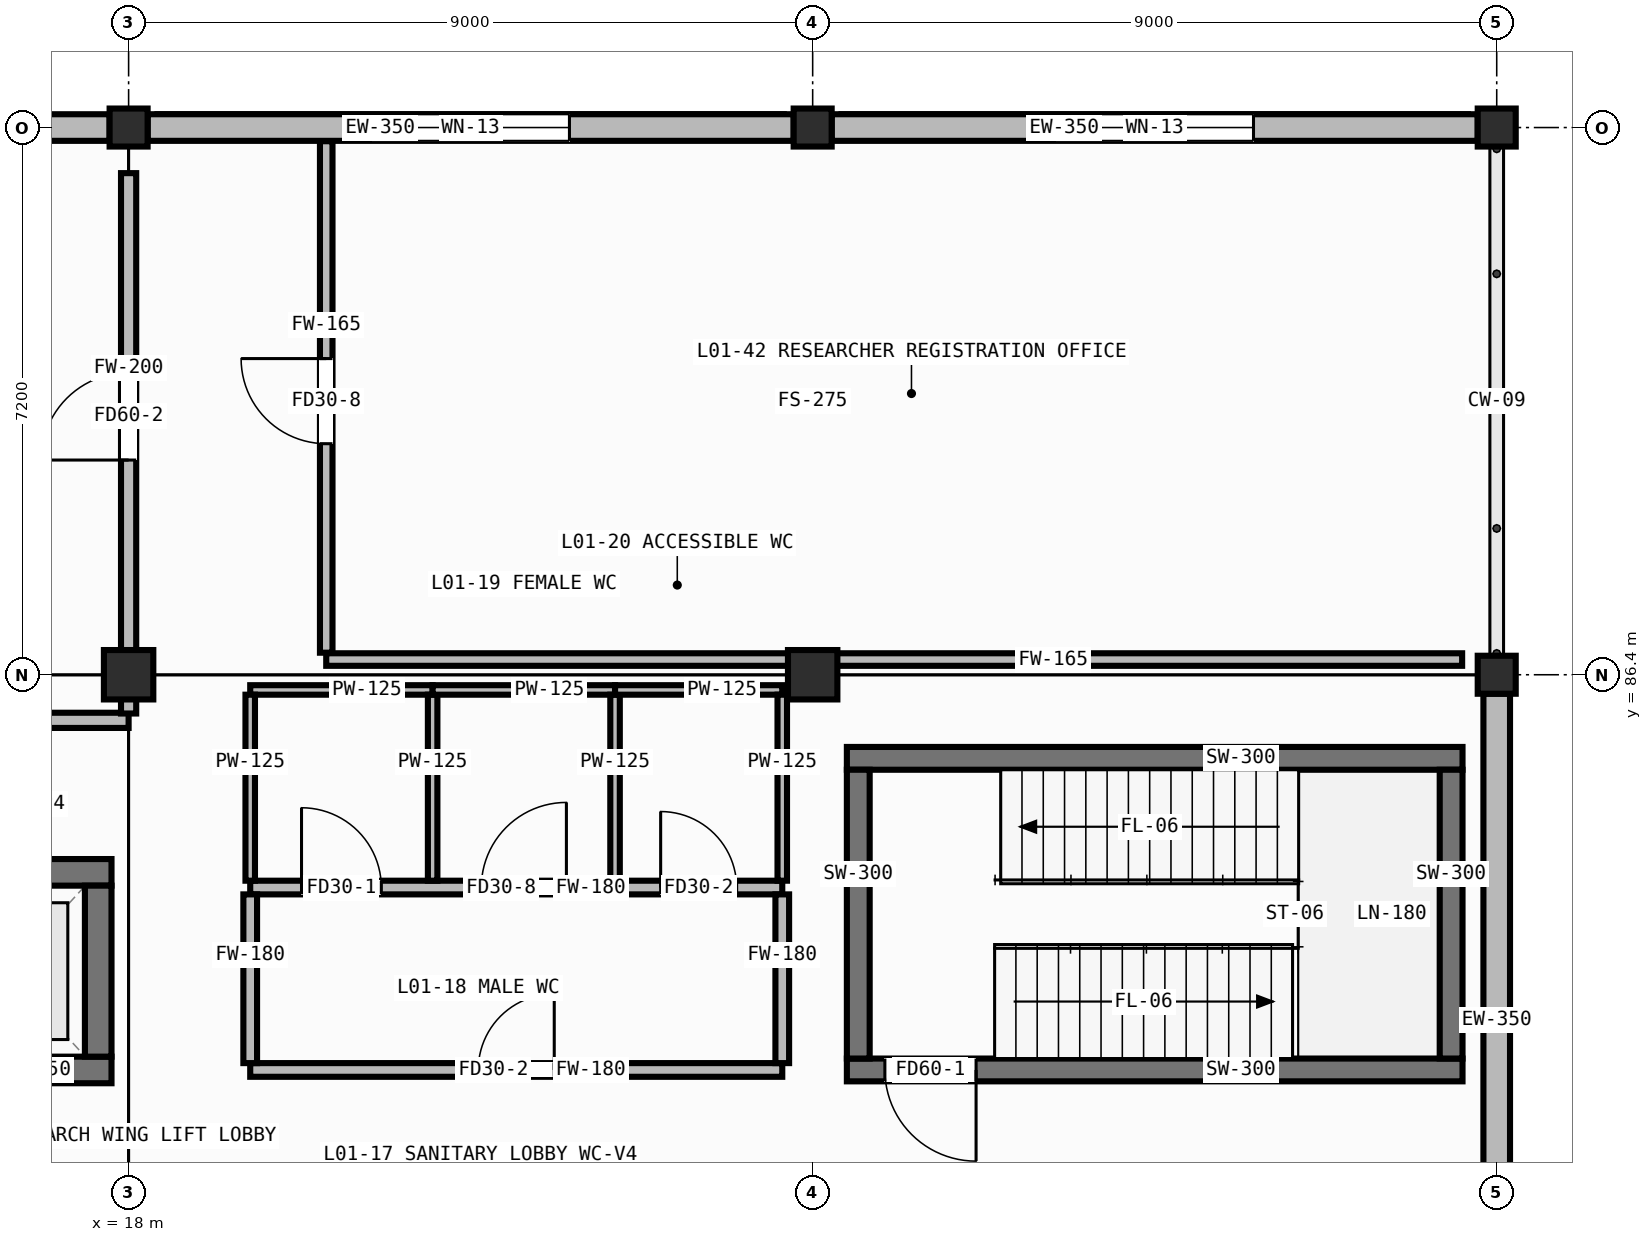
"""IFC4 building model, lengths in metres.
Left out: names, types, materials, properties, quantities, classifications, styles, units other than length and angle.
Written with IfcOpenShell. Run it as: python <this file> out.ifc"""

import sys

from ifc_helpers import new_model, si_unit, direction, frame, frame_2d, origin, origin_2d, place, context, subcontext, project, spatial, rectangle, hollow_rectangle, extrude, element, fill, save


model = new_model("IFC4")
c1 = context("Model", 3, precision=1e-05, world=origin(), true_north=direction((0.0, 1.0)))
c2 = subcontext(c1, "Body", "Model", "MODEL_VIEW")
j1 = project(units=[si_unit("LENGTHUNIT", "METRE"), si_unit("PLANEANGLEUNIT", "RADIAN")], contexts=[c1])
p1 = place(None, origin())
s1 = spatial("IfcSite", under=j1, at=p1, CompositionType="ELEMENT")
p2 = place(p1, origin())
s2 = spatial("IfcBuilding", under=s1, at=p2, CompositionType="ELEMENT")
p3 = place(p2, origin())
s3 = spatial("IfcBuildingStorey", under=s2, at=p3, CompositionType="ELEMENT", Elevation=0.0)
p4 = place(p3, frame((18.0, 86.4, 0.0), z_axis=(0.0, 0.0, 1.0), x_axis=(1.0, 0.0, 0.0)))
e1 = element("IfcColumn", 1, at=p4, inside=s3, PredefinedType="COLUMN", context=c2, shape_type="SweptSolid", body=[
    extrude(hollow_rectangle(XDim=0.65, YDim=0.65, WallThickness=0.025, at=origin_2d()), origin(), (0.0, 0.0, 1.0), 4.8),
])
p5 = place(p3, frame((18.0, 93.6, 0.0), z_axis=(0.0, 0.0, 1.0), x_axis=(1.0, 0.0, 0.0)))
e2 = element("IfcColumn", 2, at=p5, inside=s3, PredefinedType="COLUMN", context=c2, shape_type="SweptSolid", body=[
    extrude(hollow_rectangle(XDim=0.5, YDim=0.5, WallThickness=0.022, at=origin_2d()), origin(), (0.0, 0.0, 1.0), 4.8),
])
p6 = place(p3, frame((27.0, 86.4, 0.0), z_axis=(0.0, 0.0, 1.0), x_axis=(1.0, 0.0, 0.0)))
e3 = element("IfcColumn", 3, at=p6, inside=s3, PredefinedType="COLUMN", context=c2, shape_type="SweptSolid", body=[
    extrude(hollow_rectangle(XDim=0.65, YDim=0.65, WallThickness=0.025, at=origin_2d()), origin(), (0.0, 0.0, 1.0), 4.8),
])
for number, where, z_axis, x_axis in (
    (4, (27.0, 93.6, 0.0), (0.0, 0.0, 1.0), (1.0, 0.0, 0.0)),
    (5, (36.0, 86.4, 0.0), (0.0, 0.0, 1.0), (1.0, 0.0, 0.0)),
    (6, (36.0, 93.6, 0.0), (0.0, 0.0, 1.0), (1.0, 0.0, 0.0)),
):
    element("IfcColumn", number, at=place(p3, frame(where, z_axis=z_axis, x_axis=x_axis)), inside=s3, PredefinedType="COLUMN", context=c2, shape_type="SweptSolid", body=[
        extrude(hollow_rectangle(XDim=0.5, YDim=0.5, WallThickness=0.022, at=origin_2d()), origin(), (0.0, 0.0, 1.0), 4.8),
    ])
p7 = place(p3, frame((17.75, 93.6, 0.0), z_axis=(0.0, 0.0, 1.0), x_axis=(-1.0, 0.0, 0.0)))
e7 = element("IfcWall", 7, at=p7, inside=s3, PredefinedType="STANDARD", context=c2, shape_type="SweptSolid", body=[
    extrude(rectangle(XDim=8.5, YDim=0.35, at=frame_2d((4.25, 0.0))), origin(), (0.0, 0.0, 1.0), 4.055),
])
p8 = place(p7, frame((3.3, 0.0, 0.0)))
e8 = element("IfcOpeningElement", 8, at=p8, cuts=e7, PredefinedType="OPENING", context=c2, shape_type="SweptSolid", body=[
    extrude(rectangle(XDim=1.9, YDim=2.4, at=frame_2d((0.95, 1.2))), frame((0.0, 0.187, 0.0), z_axis=(0.0, -1.0, 0.0), x_axis=(1.0, 0.0, 0.0)), (0.0, 0.0, 1.0), 0.374),
])
p9 = place(p3, frame((26.75, 93.6, 0.0), z_axis=(0.0, 0.0, 1.0), x_axis=(-1.0, 0.0, 0.0)))
e9 = element("IfcWall", 9, at=p9, inside=s3, PredefinedType="STANDARD", context=c2, shape_type="SweptSolid", body=[
    extrude(rectangle(XDim=8.5, YDim=0.35, at=frame_2d((4.25, 0.0))), origin(), (0.0, 0.0, 1.0), 4.055),
])
p10 = place(p9, frame((2.95, 0.0, 0.85)))
e10 = element("IfcOpeningElement", 10, at=p10, cuts=e9, PredefinedType="OPENING", context=c2, shape_type="SweptSolid", body=[
    extrude(rectangle(XDim=2.6, YDim=1.6, at=frame_2d((1.3, 0.8))), frame((0.0, 0.187, 0.0), z_axis=(0.0, -1.0, 0.0), x_axis=(1.0, 0.0, 0.0)), (0.0, 0.0, 1.0), 0.374),
])
p11 = place(p3, frame((35.75, 93.6, 0.0), z_axis=(0.0, 0.0, 1.0), x_axis=(-1.0, 0.0, 0.0)))
e11 = element("IfcWall", 11, at=p11, inside=s3, PredefinedType="STANDARD", context=c2, shape_type="SweptSolid", body=[
    extrude(rectangle(XDim=8.5, YDim=0.35, at=frame_2d((4.25, 0.0))), origin(), (0.0, 0.0, 1.0), 4.055),
])
p12 = place(p11, frame((2.95, 0.0, 0.85)))
e12 = element("IfcOpeningElement", 12, at=p12, cuts=e11, PredefinedType="OPENING", context=c2, shape_type="SweptSolid", body=[
    extrude(rectangle(XDim=2.6, YDim=1.6, at=frame_2d((1.3, 0.8))), frame((0.0, 0.187, 0.0), z_axis=(0.0, -1.0, 0.0), x_axis=(1.0, 0.0, 0.0)), (0.0, 0.0, 1.0), 0.374),
])
p13 = place(p3, frame((36.0, 86.15, 0.0), z_axis=(0.0, 0.0, 1.0), x_axis=(0.0, -1.0, 0.0)))
e13 = element("IfcWall", 13, at=p13, inside=s3, PredefinedType="STANDARD", context=c2, shape_type="SweptSolid", body=[
    extrude(rectangle(XDim=6.7, YDim=0.35, at=frame_2d((3.35, 0.0))), origin(), (0.0, 0.0, 1.0), 4.055),
])
p14 = place(p3, frame((27.45, 81.2, 0.0), z_axis=(0.0, 0.0, 1.0), x_axis=(1.0, 0.0, 0.0)))
e14 = element("IfcWall", 14, at=p14, inside=s3, PredefinedType="SHEAR", context=c2, shape_type="SweptSolid", body=[
    extrude(rectangle(XDim=8.1, YDim=0.3, at=frame_2d((4.05, 0.0))), origin(), (0.0, 0.0, 1.0), 4.555),
])
p15 = place(p14, frame((0.5, 0.0, 0.0)))
e15 = element("IfcOpeningElement", 15, at=p15, cuts=e14, PredefinedType="OPENING", context=c2, shape_type="SweptSolid", body=[
    extrude(rectangle(XDim=1.2, YDim=2.1, at=frame_2d((0.6, 1.05))), frame((0.0, 0.162, 0.0), z_axis=(0.0, -1.0, 0.0), x_axis=(1.0, 0.0, 0.0)), (0.0, 0.0, 1.0), 0.324),
])
p16 = place(p3, frame((27.45, 85.3, 0.0), z_axis=(0.0, 0.0, 1.0), x_axis=(1.0, 0.0, 0.0)))
e16 = element("IfcWall", 16, at=p16, inside=s3, PredefinedType="SHEAR", context=c2, shape_type="SweptSolid", body=[
    extrude(rectangle(XDim=8.1, YDim=0.3, at=frame_2d((4.05, 0.0))), origin(), (0.0, 0.0, 1.0), 4.555),
])
for number, where, z_axis, x_axis in (
    (17, (27.6, 81.35, 0.0), (0.0, 0.0, 1.0), (0.0, 1.0, 0.0)),
    (18, (35.4, 81.35, 0.0), (0.0, 0.0, 1.0), (0.0, 1.0, 0.0)),
):
    element("IfcWall", number, at=place(p3, frame(where, z_axis=z_axis, x_axis=x_axis)), inside=s3, PredefinedType="SHEAR", context=c2, shape_type="SweptSolid", body=[
        extrude(rectangle(XDim=3.8, YDim=0.3, at=frame_2d((1.9, 0.0))), origin(), (0.0, 0.0, 1.0), 4.555),
    ])
p17 = place(p3, frame((15.025, 81.2, 0.0), z_axis=(0.0, 0.0, 1.0), x_axis=(1.0, 0.0, 0.0)))
e19 = element("IfcWall", 19, at=p17, inside=s3, PredefinedType="SHEAR", context=c2, shape_type="SweptSolid", body=[
    extrude(rectangle(XDim=2.75, YDim=0.35, at=frame_2d((1.375, 0.0))), origin(), (0.0, 0.0, 1.0), 4.555),
])
p18 = place(p17, frame((0.825, 0.0, 0.0)))
e20 = element("IfcOpeningElement", 20, at=p18, cuts=e19, PredefinedType="OPENING", context=c2, shape_type="SweptSolid", body=[
    extrude(rectangle(XDim=1.1, YDim=2.1, at=frame_2d((0.55, 1.05))), frame((0.0, 0.187, 0.0), z_axis=(0.0, -1.0, 0.0), x_axis=(1.0, 0.0, 0.0)), (0.0, 0.0, 1.0), 0.374),
])
p19 = place(p3, frame((15.025, 83.8, 0.0), z_axis=(0.0, 0.0, 1.0), x_axis=(1.0, 0.0, 0.0)))
e21 = element("IfcWall", 21, at=p19, inside=s3, PredefinedType="SHEAR", context=c2, shape_type="SweptSolid", body=[
    extrude(rectangle(XDim=2.75, YDim=0.35, at=frame_2d((1.375, 0.0))), origin(), (0.0, 0.0, 1.0), 4.555),
])
p20 = place(p3, frame((17.6, 81.375, 0.0), z_axis=(0.0, 0.0, 1.0), x_axis=(0.0, 1.0, 0.0)))
e22 = element("IfcWall", 22, at=p20, inside=s3, PredefinedType="SHEAR", context=c2, shape_type="SweptSolid", body=[
    extrude(rectangle(XDim=2.25, YDim=0.35, at=frame_2d((1.125, 0.0))), origin(), (0.0, 0.0, 1.0), 4.555),
])
p21 = place(p3, frame((19.6, 81.2, 0.0), z_axis=(0.0, 0.0, 1.0), x_axis=(1.0, 0.0, 0.0)))
e23 = element("IfcWall", 23, at=p21, inside=s3, PredefinedType="PARTITIONING", context=c2, shape_type="SweptSolid", body=[
    extrude(rectangle(XDim=7.0, YDim=0.18, at=frame_2d((3.5, 0.0))), origin(), (0.0, 0.0, 1.0), 4.555),
])
p22 = place(p21, frame((3.0, 0.0, 0.0)))
e24 = element("IfcOpeningElement", 24, at=p22, cuts=e23, PredefinedType="OPENING", context=c2, shape_type="SweptSolid", body=[
    extrude(rectangle(XDim=1.0, YDim=2.08, at=frame_2d((0.5, 1.04))), frame((0.0, 0.102, 0.0), z_axis=(0.0, -1.0, 0.0), x_axis=(1.0, 0.0, 0.0)), (0.0, 0.0, 1.0), 0.204),
])
p23 = place(p3, frame((19.6, 83.6, 0.0), z_axis=(0.0, 0.0, 1.0), x_axis=(1.0, 0.0, 0.0)))
e25 = element("IfcWall", 25, at=p23, inside=s3, PredefinedType="PARTITIONING", context=c2, shape_type="SweptSolid", body=[
    extrude(rectangle(XDim=7.0, YDim=0.18, at=frame_2d((3.5, 0.0))), origin(), (0.0, 0.0, 1.0), 4.555),
])
p24 = place(p23, frame((0.675, 0.0, 0.0)))
e26 = element("IfcOpeningElement", 26, at=p24, cuts=e25, PredefinedType="OPENING", context=c2, shape_type="SweptSolid", body=[
    extrude(rectangle(XDim=1.05, YDim=2.1, at=frame_2d((0.525, 1.05))), frame((0.0, 0.102, 0.0), z_axis=(0.0, -1.0, 0.0), x_axis=(1.0, 0.0, 0.0)), (0.0, 0.0, 1.0), 0.204),
])
p25 = place(p23, frame((3.04, 0.0, 0.0)))
e27 = element("IfcOpeningElement", 27, at=p25, cuts=e25, PredefinedType="OPENING", context=c2, shape_type="SweptSolid", body=[
    extrude(rectangle(XDim=1.12, YDim=2.08, at=frame_2d((0.56, 1.04))), frame((0.0, 0.102, 0.0), z_axis=(0.0, -1.0, 0.0), x_axis=(1.0, 0.0, 0.0)), (0.0, 0.0, 1.0), 0.204),
])
p26 = place(p23, frame((5.4, 0.0, 0.0)))
e28 = element("IfcOpeningElement", 28, at=p26, cuts=e25, PredefinedType="OPENING", context=c2, shape_type="SweptSolid", body=[
    extrude(rectangle(XDim=1.0, YDim=2.08, at=frame_2d((0.5, 1.04))), frame((0.0, 0.102, 0.0), z_axis=(0.0, -1.0, 0.0), x_axis=(1.0, 0.0, 0.0)), (0.0, 0.0, 1.0), 0.204),
])
for number, where, z_axis, x_axis in (
    (29, (19.6, 81.29, 0.0), (0.0, 0.0, 1.0), (0.0, 1.0, 0.0)),
    (30, (26.6, 81.29, 0.0), (0.0, 0.0, 1.0), (0.0, 1.0, 0.0)),
):
    element("IfcWall", number, at=place(p3, frame(where, z_axis=z_axis, x_axis=x_axis)), inside=s3, PredefinedType="PARTITIONING", context=c2, shape_type="SweptSolid", body=[
        extrude(rectangle(XDim=2.22, YDim=0.18, at=frame_2d((1.11, 0.0))), origin(), (0.0, 0.0, 1.0), 4.555),
    ])
p27 = place(p3, frame((19.6, 86.2, 0.0), z_axis=(0.0, 0.0, 1.0), x_axis=(1.0, 0.0, 0.0)))
e31 = element("IfcWall", 31, at=p27, inside=s3, PredefinedType="PARTITIONING", context=c2, shape_type="SweptSolid", body=[
    extrude(rectangle(XDim=2.4, YDim=0.125, at=frame_2d((1.2, 0.0))), origin(), (0.0, 0.0, 1.0), 3.835),
])
for number, where, z_axis, x_axis in (
    (32, (19.6, 83.69, 0.0), (0.0, 0.0, 1.0), (0.0, 1.0, 0.0)),
    (33, (22.0, 83.69, 0.0), (0.0, 0.0, 1.0), (0.0, 1.0, 0.0)),
):
    element("IfcWall", number, at=place(p3, frame(where, z_axis=z_axis, x_axis=x_axis)), inside=s3, PredefinedType="PARTITIONING", context=c2, shape_type="SweptSolid", body=[
        extrude(rectangle(XDim=2.448, YDim=0.125, at=frame_2d((1.224, 0.0))), origin(), (0.0, 0.0, 1.0), 4.555),
    ])
p28 = place(p3, frame((22.0, 86.2, 0.0), z_axis=(0.0, 0.0, 1.0), x_axis=(1.0, 0.0, 0.0)))
e34 = element("IfcWall", 34, at=p28, inside=s3, PredefinedType="PARTITIONING", context=c2, shape_type="SweptSolid", body=[
    extrude(rectangle(XDim=2.4, YDim=0.125, at=frame_2d((1.2, 0.0))), origin(), (0.0, 0.0, 1.0), 3.835),
])
p29 = place(p3, frame((24.4, 83.69, 0.0), z_axis=(0.0, 0.0, 1.0), x_axis=(0.0, 1.0, 0.0)))
e35 = element("IfcWall", 35, at=p29, inside=s3, PredefinedType="PARTITIONING", context=c2, shape_type="SweptSolid", body=[
    extrude(rectangle(XDim=2.448, YDim=0.125, at=frame_2d((1.224, 0.0))), origin(), (0.0, 0.0, 1.0), 4.555),
])
p30 = place(p3, frame((24.4, 86.2, 0.0), z_axis=(0.0, 0.0, 1.0), x_axis=(1.0, 0.0, 0.0)))
e36 = element("IfcWall", 36, at=p30, inside=s3, PredefinedType="PARTITIONING", context=c2, shape_type="SweptSolid", body=[
    extrude(rectangle(XDim=2.2, YDim=0.125, at=frame_2d((1.1, 0.0))), origin(), (0.0, 0.0, 1.0), 3.835),
])
p31 = place(p3, frame((26.6, 83.69, 0.0), z_axis=(0.0, 0.0, 1.0), x_axis=(0.0, 1.0, 0.0)))
e37 = element("IfcWall", 37, at=p31, inside=s3, PredefinedType="PARTITIONING", context=c2, shape_type="SweptSolid", body=[
    extrude(rectangle(XDim=2.448, YDim=0.125, at=frame_2d((1.224, 0.0))), origin(), (0.0, 0.0, 1.0), 4.555),
])
p32 = place(p3, frame((0.18, 85.8, 0.0), z_axis=(0.0, 0.0, 1.0), x_axis=(1.0, 0.0, 0.0)))
e38 = element("IfcWall", 38, at=p32, inside=s3, PredefinedType="PARTITIONING", context=c2, shape_type="SweptSolid", body=[
    extrude(rectangle(XDim=17.82, YDim=0.2, at=frame_2d((8.91, 0.0))), origin(), (0.0, 0.0, 1.0), 4.555),
])
p33 = place(p3, frame((18.0, 85.89, 0.0), z_axis=(0.0, 0.0, 1.0), x_axis=(0.0, 1.0, 0.0)))
e39 = element("IfcWall", 39, at=p33, inside=s3, PredefinedType="PARTITIONING", context=c2, shape_type="SweptSolid", body=[
    extrude(rectangle(XDim=7.11, YDim=0.2, at=frame_2d((3.555, 0.0))), origin(), (0.0, 0.0, 1.0), 3.835),
])
p34 = place(p33, frame((3.335, 0.0, 0.0)))
e40 = element("IfcOpeningElement", 40, at=p34, cuts=e39, PredefinedType="OPENING", context=c2, shape_type="SweptSolid", body=[
    extrude(rectangle(XDim=1.15, YDim=2.1, at=frame_2d((0.575, 1.05))), frame((0.0, 0.112, 0.0), z_axis=(0.0, -1.0, 0.0), x_axis=(1.0, 0.0, 0.0)), (0.0, 0.0, 1.0), 0.224),
])
p35 = place(p3, frame((20.6, 86.6, 0.0), z_axis=(0.0, 0.0, 1.0), x_axis=(1.0, 0.0, 0.0)))
e41 = element("IfcWall", 41, at=p35, inside=s3, PredefinedType="PARTITIONING", context=c2, shape_type="SweptSolid", body=[
    extrude(rectangle(XDim=14.945, YDim=0.165, at=frame_2d((7.472, 0.0))), origin(), (0.0, 0.0, 1.0), 3.835),
])
p36 = place(p3, frame((20.6, 86.69, 0.0), z_axis=(0.0, 0.0, 1.0), x_axis=(0.0, 1.0, 0.0)))
e42 = element("IfcWall", 42, at=p36, inside=s3, PredefinedType="PARTITIONING", context=c2, shape_type="SweptSolid", body=[
    extrude(rectangle(XDim=6.73, YDim=0.165, at=frame_2d((3.365, 0.0))), origin(), (0.0, 0.0, 1.0), 4.555),
])
p37 = place(p36, frame((2.75, 0.0, 0.0)))
e43 = element("IfcOpeningElement", 43, at=p37, cuts=e42, PredefinedType="OPENING", context=c2, shape_type="SweptSolid", body=[
    extrude(rectangle(XDim=1.12, YDim=2.08, at=frame_2d((0.56, 1.04))), frame((0.0, 0.094, 0.0), z_axis=(0.0, -1.0, 0.0), x_axis=(1.0, 0.0, 0.0)), (0.0, 0.0, 1.0), 0.189),
])
p38 = place(p10, origin())
e44 = element("IfcWindow", 44, at=p38, inside=s3, PartitioningType="DOUBLE_PANEL_VERTICAL", PredefinedType="WINDOW", context=c2, shape_type="SweptSolid", body=[
    extrude(rectangle(XDim=2.6, YDim=1.6, at=frame_2d((1.3, 0.8))), frame((0.0, 0.03, 0.0), z_axis=(0.0, -1.0, 0.0), x_axis=(1.0, 0.0, 0.0)), (0.0, 0.0, 1.0), 0.06),
])
fill(e10, e44)
p39 = place(p12, origin())
e45 = element("IfcWindow", 45, at=p39, inside=s3, PartitioningType="DOUBLE_PANEL_VERTICAL", PredefinedType="WINDOW", context=c2, shape_type="SweptSolid", body=[
    extrude(rectangle(XDim=2.6, YDim=1.6, at=frame_2d((1.3, 0.8))), frame((0.0, 0.03, 0.0), z_axis=(0.0, -1.0, 0.0), x_axis=(1.0, 0.0, 0.0)), (0.0, 0.0, 1.0), 0.06),
])
fill(e12, e45)
p40 = place(p15, frame((1.2, 0.0, 0.0), z_axis=(0.0, 0.0, 1.0), x_axis=(-1.0, 0.0, 0.0)))
e46 = element("IfcDoor", 46, at=p40, inside=s3, OperationType="SINGLE_SWING_LEFT", PredefinedType="DOOR", context=c2, shape_type="SweptSolid", body=[
    extrude(rectangle(XDim=1.2, YDim=2.1, at=frame_2d((0.6, 1.05))), frame((0.0, 0.025, 0.0), z_axis=(0.0, -1.0, 0.0), x_axis=(1.0, 0.0, 0.0)), (0.0, 0.0, 1.0), 0.05),
])
fill(e15, e46)
p41 = place(p22, origin())
e47 = element("IfcDoor", 47, at=p41, inside=s3, OperationType="SINGLE_SWING_RIGHT", PredefinedType="DOOR", context=c2, shape_type="SweptSolid", body=[
    extrude(rectangle(XDim=1.0, YDim=2.08, at=frame_2d((0.5, 1.04))), frame((0.0, 0.025, 0.0), z_axis=(0.0, -1.0, 0.0), x_axis=(1.0, 0.0, 0.0)), (0.0, 0.0, 1.0), 0.05),
])
fill(e24, e47)
p42 = place(p24, origin())
e48 = element("IfcDoor", 48, at=p42, inside=s3, OperationType="SINGLE_SWING_LEFT", PredefinedType="DOOR", context=c2, shape_type="SweptSolid", body=[
    extrude(rectangle(XDim=1.05, YDim=2.1, at=frame_2d((0.525, 1.05))), frame((0.0, 0.025, 0.0), z_axis=(0.0, -1.0, 0.0), x_axis=(1.0, 0.0, 0.0)), (0.0, 0.0, 1.0), 0.05),
])
fill(e26, e48)
p43 = place(p25, origin())
e49 = element("IfcDoor", 49, at=p43, inside=s3, OperationType="SINGLE_SWING_RIGHT", PredefinedType="DOOR", context=c2, shape_type="SweptSolid", body=[
    extrude(rectangle(XDim=1.12, YDim=2.08, at=frame_2d((0.56, 1.04))), frame((0.0, 0.025, 0.0), z_axis=(0.0, -1.0, 0.0), x_axis=(1.0, 0.0, 0.0)), (0.0, 0.0, 1.0), 0.05),
])
fill(e27, e49)
p44 = place(p26, origin())
e50 = element("IfcDoor", 50, at=p44, inside=s3, OperationType="SINGLE_SWING_LEFT", PredefinedType="DOOR", context=c2, shape_type="SweptSolid", body=[
    extrude(rectangle(XDim=1.0, YDim=2.08, at=frame_2d((0.5, 1.04))), frame((0.0, 0.025, 0.0), z_axis=(0.0, -1.0, 0.0), x_axis=(1.0, 0.0, 0.0)), (0.0, 0.0, 1.0), 0.05),
])
fill(e28, e50)
p45 = place(p34, origin())
e51 = element("IfcDoor", 51, at=p45, inside=s3, OperationType="SINGLE_SWING_LEFT", PredefinedType="DOOR", context=c2, shape_type="SweptSolid", body=[
    extrude(rectangle(XDim=1.15, YDim=2.1, at=frame_2d((0.575, 1.05))), frame((0.0, 0.025, 0.0), z_axis=(0.0, -1.0, 0.0), x_axis=(1.0, 0.0, 0.0)), (0.0, 0.0, 1.0), 0.05),
])
fill(e40, e51)
p46 = place(p37, origin())
e52 = element("IfcDoor", 52, at=p46, inside=s3, OperationType="SINGLE_SWING_RIGHT", PredefinedType="DOOR", context=c2, shape_type="SweptSolid", body=[
    extrude(rectangle(XDim=1.12, YDim=2.08, at=frame_2d((0.56, 1.04))), frame((0.0, 0.025, 0.0), z_axis=(0.0, -1.0, 0.0), x_axis=(1.0, 0.0, 0.0)), (0.0, 0.0, 1.0), 0.05),
])
fill(e43, e52)
save(model, sys.argv[1])
